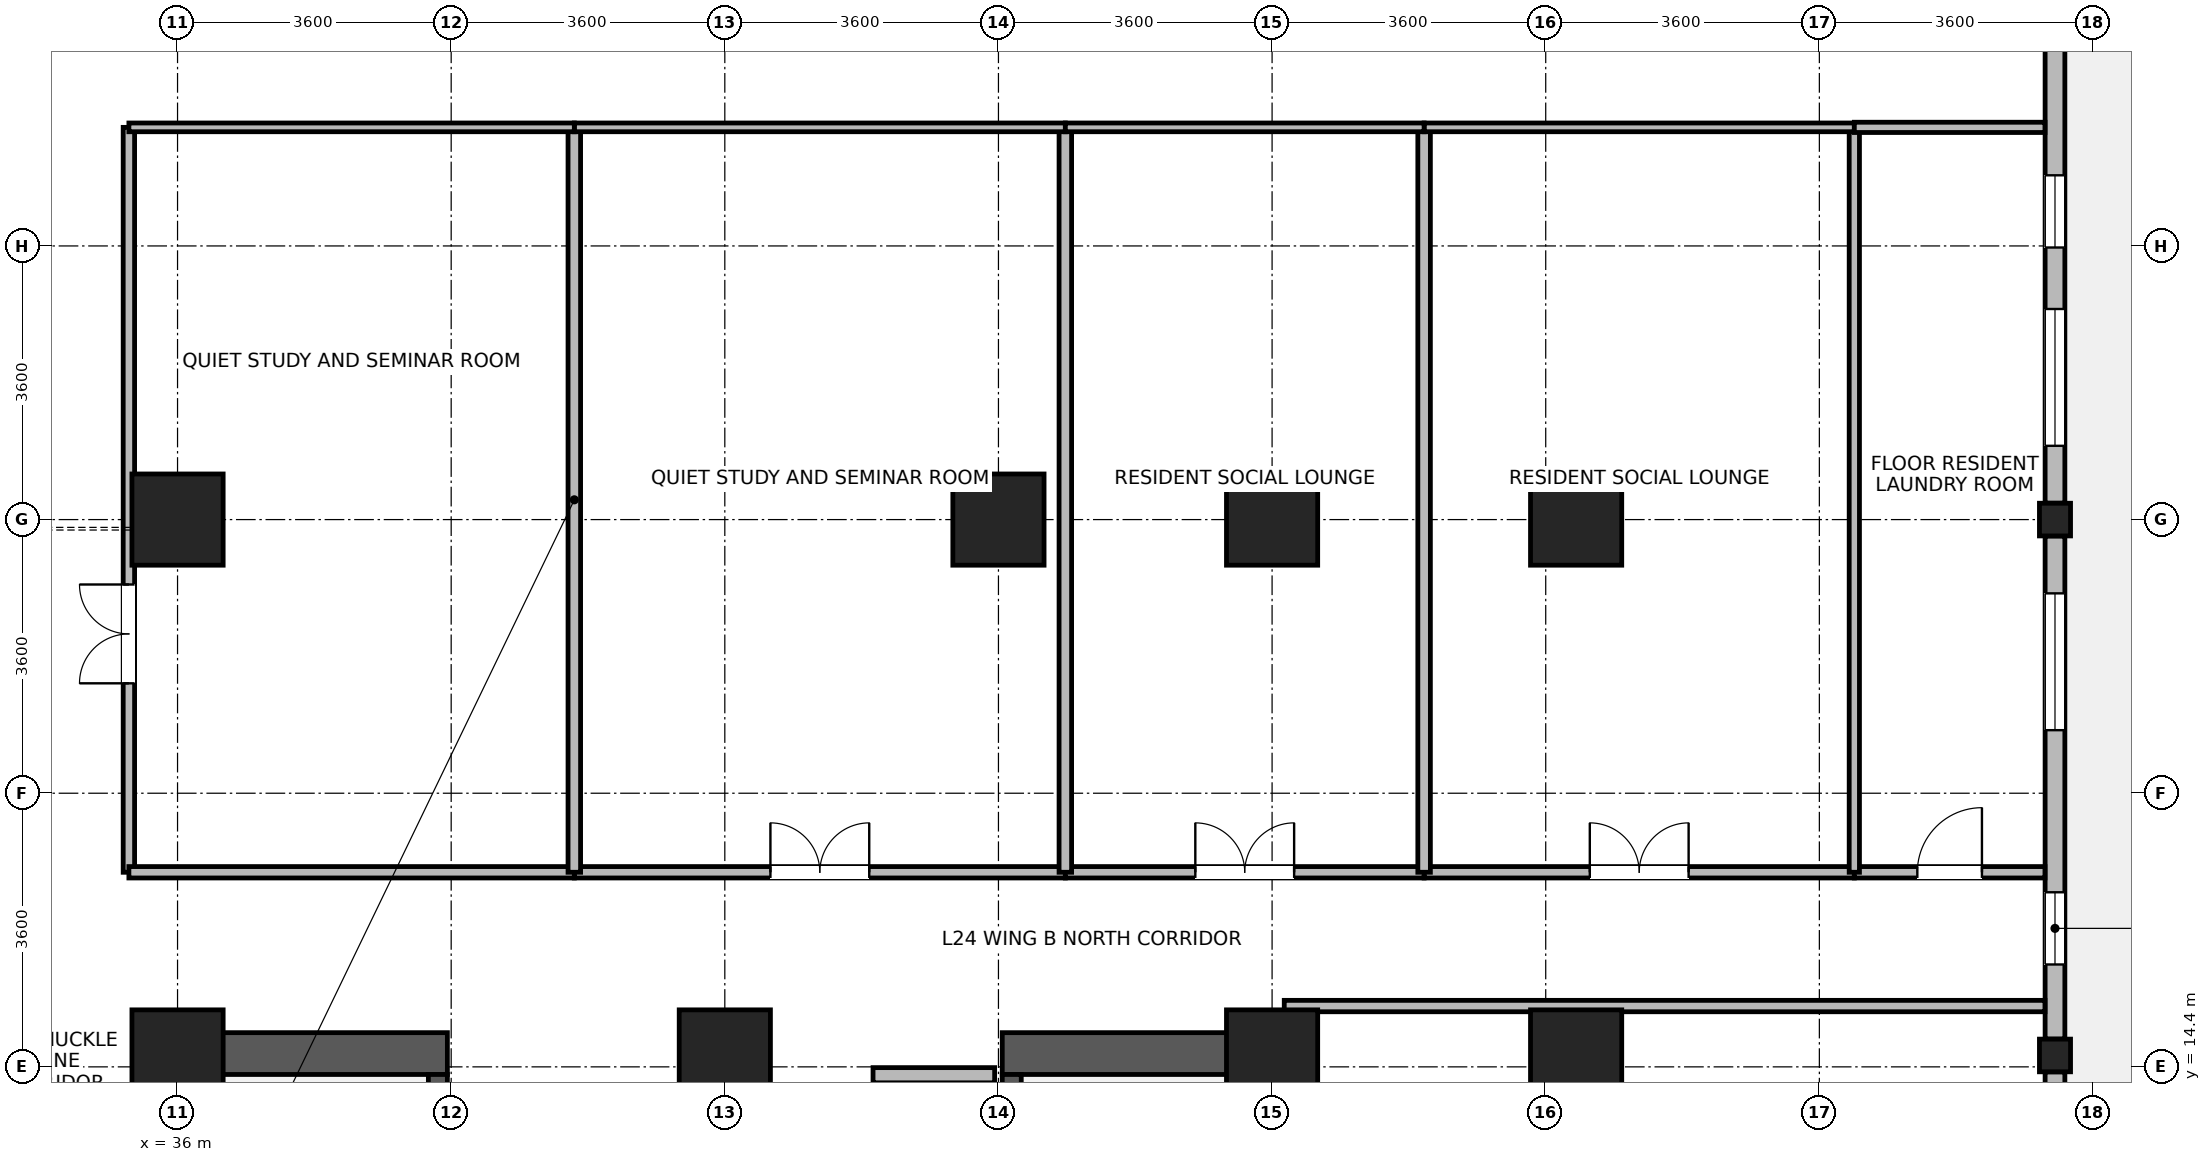
"""IFC4 building model, lengths in metres.
Left out: names, types, materials, properties, quantities, classifications, styles, units other than length and angle.
Written with IfcOpenShell. Run it as: python <this file> out.ifc"""

import sys

from ifc_helpers import new_model, si_unit, direction, frame, frame_2d, origin, origin_2d, place, context, subcontext, project, spatial, rectangle, i_section, extrude, source, transform, mapped, element, fill, save


model = new_model("IFC4")
c1 = context("Model", 3, precision=1e-05, world=origin(), true_north=direction((0.0, 1.0)))
c2 = subcontext(c1, "Body", "Model", "MODEL_VIEW")
j1 = project(units=[si_unit("LENGTHUNIT", "METRE"), si_unit("PLANEANGLEUNIT", "RADIAN")], contexts=[c1])
p1 = place(None, origin())
s1 = spatial("IfcSite", under=j1, at=p1, CompositionType="ELEMENT")
p2 = place(p1, origin())
s2 = spatial("IfcBuilding", under=s1, at=p2, CompositionType="ELEMENT")
p3 = place(p2, frame((0.0, 0.0, 97.1)))
s3 = spatial("IfcBuildingStorey", under=s2, at=p3, CompositionType="ELEMENT", Elevation=97.1)
for number, where, z_axis, x_axis in (
    (1, (36.075, 6.75, 0.0), (0.0, 0.0, 1.0), (0.0, 1.0, 0.0)),
    (2, (50.325, 6.75, 0.0), (0.0, 0.0, 1.0), (0.0, 1.0, 0.0)),
):
    element("IfcWall", number, at=place(p3, frame(where, z_axis=z_axis, x_axis=x_axis)), inside=s3, PredefinedType="SHEAR", context=c2, shape_type="SweptSolid", body=[
        extrude(rectangle(XDim=8.1, YDim=0.55, at=frame_2d((4.05, 0.0))), origin(), (0.0, 0.0, 1.0), 3.45),
    ])
for number, where, z_axis, x_axis in (
    (3, (36.35, 14.575, 0.0), (0.0, 0.0, 1.0), (1.0, 0.0, 0.0)),
    (4, (46.85, 14.575, 0.0), (0.0, 0.0, 1.0), (1.0, 0.0, 0.0)),
):
    element("IfcWall", number, at=place(p3, frame(where, z_axis=z_axis, x_axis=x_axis)), inside=s3, PredefinedType="SHEAR", context=c2, shape_type="SweptSolid", body=[
        extrude(rectangle(XDim=3.2, YDim=0.55, at=frame_2d((1.6, 0.0))), origin(), (0.0, 0.0, 1.0), 3.45),
    ])
p4 = place(p3, frame((39.425, 7.3, 0.0), z_axis=(0.0, 0.0, 1.0), x_axis=(0.0, 1.0, 0.0)))
e5 = element("IfcWall", 5, at=p4, inside=s3, PredefinedType="SHEAR", context=c2, shape_type="SweptSolid", body=[
    extrude(rectangle(XDim=7.0, YDim=0.25, at=frame_2d((3.5, 0.0))), origin(), (0.0, 0.0, 1.0), 3.45),
])
p5 = place(p4, frame((0.15, 0.0, 0.0)))
e6 = element("IfcOpeningElement", 6, at=p5, cuts=e5, PredefinedType="OPENING", context=c2, shape_type="SweptSolid", body=[
    extrude(rectangle(XDim=1.1, YDim=2.08, at=frame_2d((0.55, 1.04))), frame((0.0, 0.135, 0.0), z_axis=(0.0, -1.0, 0.0), x_axis=(1.0, 0.0, 0.0)), (0.0, 0.0, 1.0), 0.27),
])
p6 = place(p3, frame((46.975, 7.3, 0.0), z_axis=(0.0, 0.0, 1.0), x_axis=(0.0, 1.0, 0.0)))
e7 = element("IfcWall", 7, at=p6, inside=s3, PredefinedType="SHEAR", context=c2, shape_type="SweptSolid", body=[
    extrude(rectangle(XDim=7.0, YDim=0.25, at=frame_2d((3.5, 0.0))), origin(), (0.0, 0.0, 1.0), 3.45),
])
p7 = place(p6, frame((0.15, 0.0, 0.0)))
e8 = element("IfcOpeningElement", 8, at=p7, cuts=e7, PredefinedType="OPENING", context=c2, shape_type="SweptSolid", body=[
    extrude(rectangle(XDim=1.1, YDim=2.08, at=frame_2d((0.55, 1.04))), frame((0.0, 0.135, 0.0), z_axis=(0.0, -1.0, 0.0), x_axis=(1.0, 0.0, 0.0)), (0.0, 0.0, 1.0), 0.27),
])
m1 = source(origin(), c2, "Body", "SweptSolid", [
    extrude(rectangle(XDim=1.2, YDim=1.2, at=origin_2d()), origin(), (0.0, 0.0, 1.0), 3.7),
])
for number, where, z_axis, x_axis in (
    (9, (36.0, 21.6, 0.0), (0.0, 0.0, 1.0), (1.0, 0.0, 0.0)),
    (10, (46.8, 21.6, 0.0), (0.0, 0.0, 1.0), (1.0, 0.0, 0.0)),
    (11, (36.0, 14.55, 0.0), (0.0, 0.0, 1.0), (1.0, 0.0, 0.0)),
    (12, (43.2, 14.55, 0.0), (0.0, 0.0, 1.0), (1.0, 0.0, 0.0)),
    (13, (50.4, 14.55, 0.0), (0.0, 0.0, 1.0), (1.0, 0.0, 0.0)),
    (14, (50.4, 21.6, 0.0), (0.0, 0.0, 1.0), (1.0, 0.0, 0.0)),
    (15, (54.4, 14.55, 0.0), (0.0, 0.0, 1.0), (1.0, 0.0, 0.0)),
    (16, (54.4, 21.6, 0.0), (0.0, 0.0, 1.0), (1.0, 0.0, 0.0)),
):
    element("IfcColumn", number, at=place(p3, frame(where, z_axis=z_axis, x_axis=x_axis)), inside=s3, PredefinedType="COLUMN", context=c2, shape_type="MappedRepresentation", body=[
        mapped(m1, transform((0.0, 0.0, 0.0), x_axis=(1.0, 0.0, 0.0), y_axis=(0.0, 1.0, 0.0), z_axis=(0.0, 0.0, 1.0), scale=1.0)),
    ])
m2 = source(origin(), c2, "Body", "SweptSolid", [
    extrude(i_section(OverallWidth=0.409, OverallDepth=0.43, WebThickness=0.024, FlangeThickness=0.033, FilletRadius=0.015, at=origin_2d()), origin(), (0.0, 0.0, 1.0), 3.7),
])
for number, where, z_axis, x_axis in (
    (17, (60.7, 14.55, 0.0), (0.0, 0.0, 1.0), (1.0, 0.0, 0.0)),
    (18, (60.7, 21.6, 0.0), (0.0, 0.0, 1.0), (1.0, 0.0, 0.0)),
):
    element("IfcColumn", number, at=place(p3, frame(where, z_axis=z_axis, x_axis=x_axis)), inside=s3, PredefinedType="COLUMN", context=c2, shape_type="MappedRepresentation", body=[
        mapped(m2, transform((0.0, 0.0, 0.0), x_axis=(1.0, 0.0, 0.0), y_axis=(0.0, 1.0, 0.0), z_axis=(0.0, 0.0, 1.0), scale=1.0)),
    ])
p8 = place(p3, frame((60.7, 14.334, 0.0), z_axis=(0.0, 0.0, 1.0), x_axis=(0.0, -1.0, 0.0)))
e19 = element("IfcWall", 19, at=p8, inside=s3, PredefinedType="STANDARD", context=c2, shape_type="SweptSolid", body=[
    extrude(rectangle(XDim=7.068, YDim=0.26, at=frame_2d((3.534, 0.0))), origin(), (0.0, 0.0, 1.0), 2.98),
])
p9 = place(p8, frame((0.867, 0.0, 0.85)))
e20 = element("IfcOpeningElement", 20, at=p9, cuts=e19, PredefinedType="OPENING", context=c2, shape_type="SweptSolid", body=[
    extrude(rectangle(XDim=1.8, YDim=1.85, at=frame_2d((0.9, 0.925))), frame((0.0, 0.14, 0.0), z_axis=(0.0, -1.0, 0.0), x_axis=(1.0, 0.0, 0.0)), (0.0, 0.0, 1.0), 0.28),
])
p10 = place(p8, frame((4.401, 0.0, 0.85)))
e21 = element("IfcOpeningElement", 21, at=p10, cuts=e19, PredefinedType="OPENING", context=c2, shape_type="SweptSolid", body=[
    extrude(rectangle(XDim=1.8, YDim=1.85, at=frame_2d((0.9, 0.925))), frame((0.0, 0.14, 0.0), z_axis=(0.0, -1.0, 0.0), x_axis=(1.0, 0.0, 0.0)), (0.0, 0.0, 1.0), 0.28),
])
p11 = place(p3, frame((60.7, 21.384, 0.0), z_axis=(0.0, 0.0, 1.0), x_axis=(0.0, -1.0, 0.0)))
e22 = element("IfcWall", 22, at=p11, inside=s3, PredefinedType="STANDARD", context=c2, shape_type="SweptSolid", body=[
    extrude(rectangle(XDim=6.618, YDim=0.26, at=frame_2d((3.309, 0.0))), origin(), (0.0, 0.0, 1.0), 2.98),
])
p12 = place(p11, frame((0.754, 0.0, 0.85)))
e23 = element("IfcOpeningElement", 23, at=p12, cuts=e22, PredefinedType="OPENING", context=c2, shape_type="SweptSolid", body=[
    extrude(rectangle(XDim=1.8, YDim=1.85, at=frame_2d((0.9, 0.925))), frame((0.0, 0.14, 0.0), z_axis=(0.0, -1.0, 0.0), x_axis=(1.0, 0.0, 0.0)), (0.0, 0.0, 1.0), 0.28),
])
p13 = place(p11, frame((4.687, 0.0, 0.85)))
e24 = element("IfcOpeningElement", 24, at=p13, cuts=e22, PredefinedType="OPENING", context=c2, shape_type="SweptSolid", body=[
    extrude(rectangle(XDim=0.95, YDim=1.75, at=frame_2d((0.475, 0.875))), frame((0.0, 0.14, 0.0), z_axis=(0.0, -1.0, 0.0), x_axis=(1.0, 0.0, 0.0)), (0.0, 0.0, 1.0), 0.28),
])
p14 = place(p3, frame((60.7, 28.434, 0.0), z_axis=(0.0, 0.0, 1.0), x_axis=(0.0, -1.0, 0.0)))
e25 = element("IfcWall", 25, at=p14, inside=s3, PredefinedType="STANDARD", context=c2, shape_type="SweptSolid", body=[
    extrude(rectangle(XDim=6.618, YDim=0.26, at=frame_2d((3.309, 0.0))), origin(), (0.0, 0.0, 1.0), 2.98),
])
p15 = place(p14, frame((4.063, 0.0, 0.85)))
e26 = element("IfcOpeningElement", 26, at=p15, cuts=e25, PredefinedType="OPENING", context=c2, shape_type="SweptSolid", body=[
    extrude(rectangle(XDim=1.8, YDim=1.85, at=frame_2d((0.9, 0.925))), frame((0.0, 0.14, 0.0), z_axis=(0.0, -1.0, 0.0), x_axis=(1.0, 0.0, 0.0)), (0.0, 0.0, 1.0), 0.28),
])
p16 = place(p14, frame((2.305, 0.0, 0.85)))
e27 = element("IfcOpeningElement", 27, at=p16, cuts=e25, PredefinedType="OPENING", context=c2, shape_type="SweptSolid", body=[
    extrude(rectangle(XDim=0.95, YDim=1.75, at=frame_2d((0.475, 0.875))), frame((0.0, 0.14, 0.0), z_axis=(0.0, -1.0, 0.0), x_axis=(1.0, 0.0, 0.0)), (0.0, 0.0, 1.0), 0.28),
])
p17 = place(p3, frame((45.15, 14.29, 0.0), z_axis=(0.0, 0.0, 1.0), x_axis=(1.0, 0.0, 0.0)))
e28 = element("IfcWall", 28, at=p17, inside=s3, PredefinedType="PARTITIONING", context=c2, shape_type="SweptSolid", body=[
    extrude(rectangle(XDim=1.6, YDim=0.2, at=frame_2d((0.8, 0.0))), origin(), (0.0, 0.0, 1.0), 2.43),
])
p18 = place(p3, frame((50.56, 15.2, 0.0), z_axis=(0.0, 0.0, 1.0), x_axis=(1.0, 0.0, 0.0)))
e29 = element("IfcWall", 29, at=p18, inside=s3, PredefinedType="PARTITIONING", context=c2, shape_type="SweptSolid", body=[
    extrude(rectangle(XDim=10.008, YDim=0.15, at=frame_2d((5.004, 0.0))), origin(), (0.0, 0.0, 1.0), 3.43),
])
p19 = place(p3, frame((35.36, 16.96, 0.0), z_axis=(0.0, 0.0, 1.0), x_axis=(0.0, 1.0, 0.0)))
e30 = element("IfcWall", 30, at=p19, inside=s3, PredefinedType="PARTITIONING", context=c2, shape_type="SweptSolid", body=[
    extrude(rectangle(XDim=9.8, YDim=0.15, at=frame_2d((4.9, 0.0))), origin(), (0.0, 0.0, 1.0), 3.43),
])
p20 = place(p19, frame((2.486, 0.0, 0.0)))
e31 = element("IfcOpeningElement", 31, at=p20, cuts=e30, PredefinedType="OPENING", context=c2, shape_type="SweptSolid", body=[
    extrude(rectangle(XDim=1.3, YDim=2.12, at=frame_2d((0.65, 1.06))), frame((0.0, 0.085, 0.0), z_axis=(0.0, -1.0, 0.0), x_axis=(1.0, 0.0, 0.0)), (0.0, 0.0, 1.0), 0.17),
])
p21 = place(p3, frame((41.22, 16.96, 0.0), z_axis=(0.0, 0.0, 1.0), x_axis=(1.0, 0.0, 0.0)))
e32 = element("IfcWall", 32, at=p21, inside=s3, PredefinedType="PARTITIONING", context=c2, shape_type="SweptSolid", body=[
    extrude(rectangle(XDim=6.46, YDim=0.15, at=frame_2d((3.23, 0.0))), origin(), (0.0, 0.0, 1.0), 3.43),
])
p22 = place(p21, frame((2.58, 0.0, 0.0)))
e33 = element("IfcOpeningElement", 33, at=p22, cuts=e32, PredefinedType="OPENING", context=c2, shape_type="SweptSolid", body=[
    extrude(rectangle(XDim=1.3, YDim=2.12, at=frame_2d((0.65, 1.06))), frame((0.0, 0.085, 0.0), z_axis=(0.0, -1.0, 0.0), x_axis=(1.0, 0.0, 0.0)), (0.0, 0.0, 1.0), 0.17),
])
p23 = place(p3, frame((35.36, 16.96, 0.0), z_axis=(0.0, 0.0, 1.0), x_axis=(1.0, 0.0, 0.0)))
e34 = element("IfcWall", 34, at=p23, inside=s3, PredefinedType="PARTITIONING", context=c2, shape_type="SweptSolid", body=[
    extrude(rectangle(XDim=5.86, YDim=0.15, at=frame_2d((2.93, 0.0))), origin(), (0.0, 0.0, 1.0), 3.43),
])
p24 = place(p3, frame((52.4, 16.96, 0.0), z_axis=(0.0, 0.0, 1.0), x_axis=(1.0, 0.0, 0.0)))
e35 = element("IfcWall", 35, at=p24, inside=s3, PredefinedType="PARTITIONING", context=c2, shape_type="SweptSolid", body=[
    extrude(rectangle(XDim=5.66, YDim=0.15, at=frame_2d((2.83, 0.0))), origin(), (0.0, 0.0, 1.0), 3.43),
])
p25 = place(p24, frame((2.18, 0.0, 0.0)))
e36 = element("IfcOpeningElement", 36, at=p25, cuts=e35, PredefinedType="OPENING", context=c2, shape_type="SweptSolid", body=[
    extrude(rectangle(XDim=1.3, YDim=2.12, at=frame_2d((0.65, 1.06))), frame((0.0, 0.085, 0.0), z_axis=(0.0, -1.0, 0.0), x_axis=(1.0, 0.0, 0.0)), (0.0, 0.0, 1.0), 0.17),
])
p26 = place(p3, frame((47.68, 16.96, 0.0), z_axis=(0.0, 0.0, 1.0), x_axis=(1.0, 0.0, 0.0)))
e37 = element("IfcWall", 37, at=p26, inside=s3, PredefinedType="PARTITIONING", context=c2, shape_type="SweptSolid", body=[
    extrude(rectangle(XDim=4.72, YDim=0.15, at=frame_2d((2.36, 0.0))), origin(), (0.0, 0.0, 1.0), 3.43),
])
p27 = place(p26, frame((1.71, 0.0, 0.0)))
e38 = element("IfcOpeningElement", 38, at=p27, cuts=e37, PredefinedType="OPENING", context=c2, shape_type="SweptSolid", body=[
    extrude(rectangle(XDim=1.3, YDim=2.12, at=frame_2d((0.65, 1.06))), frame((0.0, 0.085, 0.0), z_axis=(0.0, -1.0, 0.0), x_axis=(1.0, 0.0, 0.0)), (0.0, 0.0, 1.0), 0.17),
])
p28 = place(p3, frame((58.06, 16.96, 0.0), z_axis=(0.0, 0.0, 1.0), x_axis=(1.0, 0.0, 0.0)))
e39 = element("IfcWall", 39, at=p28, inside=s3, PredefinedType="PARTITIONING", context=c2, shape_type="SweptSolid", body=[
    extrude(rectangle(XDim=2.508, YDim=0.15, at=frame_2d((1.254, 0.0))), origin(), (0.0, 0.0, 1.0), 3.43),
])
p29 = place(p28, frame((0.829, 0.0, 0.0)))
e40 = element("IfcOpeningElement", 40, at=p29, cuts=e39, PredefinedType="OPENING", context=c2, shape_type="SweptSolid", body=[
    extrude(rectangle(XDim=0.85, YDim=2.04, at=frame_2d((0.425, 1.02))), frame((0.0, 0.085, 0.0), z_axis=(0.0, -1.0, 0.0), x_axis=(1.0, 0.0, 0.0)), (0.0, 0.0, 1.0), 0.17),
])
for number, where, z_axis, x_axis in (
    (41, (41.22, 16.96, 0.0), (0.0, 0.0, 1.0), (0.0, 1.0, 0.0)),
    (42, (47.68, 16.96, 0.0), (0.0, 0.0, 1.0), (0.0, 1.0, 0.0)),
    (43, (52.4, 16.96, 0.0), (0.0, 0.0, 1.0), (0.0, 1.0, 0.0)),
):
    element("IfcWall", number, at=place(p3, frame(where, z_axis=z_axis, x_axis=x_axis)), inside=s3, PredefinedType="PARTITIONING", context=c2, shape_type="SweptSolid", body=[
        extrude(rectangle(XDim=9.8, YDim=0.165, at=frame_2d((4.9, 0.0))), origin(), (0.0, 0.0, 1.0), 3.43),
    ])
p30 = place(p3, frame((58.06, 16.96, 0.0), z_axis=(0.0, 0.0, 1.0), x_axis=(0.0, 1.0, 0.0)))
e44 = element("IfcWall", 44, at=p30, inside=s3, PredefinedType="PARTITIONING", context=c2, shape_type="SweptSolid", body=[
    extrude(rectangle(XDim=9.8, YDim=0.135, at=frame_2d((4.9, 0.0))), origin(), (0.0, 0.0, 1.0), 3.43),
])
p31 = place(p3, frame((41.22, 26.76, 0.0), z_axis=(0.0, 0.0, 1.0), x_axis=(1.0, 0.0, 0.0)))
e45 = element("IfcWall", 45, at=p31, inside=s3, PredefinedType="PARTITIONING", context=c2, shape_type="SweptSolid", body=[
    extrude(rectangle(XDim=6.46, YDim=0.115, at=frame_2d((3.23, 0.0))), origin(), (0.0, 0.0, 1.0), 3.43),
])
p32 = place(p3, frame((35.36, 26.76, 0.0), z_axis=(0.0, 0.0, 1.0), x_axis=(1.0, 0.0, 0.0)))
e46 = element("IfcWall", 46, at=p32, inside=s3, PredefinedType="PARTITIONING", context=c2, shape_type="SweptSolid", body=[
    extrude(rectangle(XDim=5.86, YDim=0.115, at=frame_2d((2.93, 0.0))), origin(), (0.0, 0.0, 1.0), 3.43),
])
p33 = place(p3, frame((52.4, 26.76, 0.0), z_axis=(0.0, 0.0, 1.0), x_axis=(1.0, 0.0, 0.0)))
e47 = element("IfcWall", 47, at=p33, inside=s3, PredefinedType="PARTITIONING", context=c2, shape_type="SweptSolid", body=[
    extrude(rectangle(XDim=5.66, YDim=0.115, at=frame_2d((2.83, 0.0))), origin(), (0.0, 0.0, 1.0), 3.43),
])
p34 = place(p3, frame((47.68, 26.76, 0.0), z_axis=(0.0, 0.0, 1.0), x_axis=(1.0, 0.0, 0.0)))
e48 = element("IfcWall", 48, at=p34, inside=s3, PredefinedType="PARTITIONING", context=c2, shape_type="SweptSolid", body=[
    extrude(rectangle(XDim=4.72, YDim=0.115, at=frame_2d((2.36, 0.0))), origin(), (0.0, 0.0, 1.0), 3.43),
])
p35 = place(p3, frame((58.06, 26.76, 0.0), z_axis=(0.0, 0.0, 1.0), x_axis=(1.0, 0.0, 0.0)))
e49 = element("IfcWall", 49, at=p35, inside=s3, PredefinedType="PARTITIONING", context=c2, shape_type="SweptSolid", body=[
    extrude(rectangle(XDim=2.508, YDim=0.135, at=frame_2d((1.254, 0.0))), origin(), (0.0, 0.0, 1.0), 3.43),
])
p36 = place(p12, origin())
e50 = element("IfcWindow", 50, at=p36, inside=s3, PartitioningType="SINGLE_PANEL", PredefinedType="WINDOW", context=c2, shape_type="SweptSolid", body=[
    extrude(rectangle(XDim=1.8, YDim=1.85, at=frame_2d((0.9, 0.925))), frame((0.0, 0.03, 0.0), z_axis=(0.0, -1.0, 0.0), x_axis=(1.0, 0.0, 0.0)), (0.0, 0.0, 1.0), 0.06),
])
fill(e23, e50)
p37 = place(p13, origin())
e51 = element("IfcWindow", 51, at=p37, inside=s3, PartitioningType="SINGLE_PANEL", PredefinedType="WINDOW", context=c2, shape_type="SweptSolid", body=[
    extrude(rectangle(XDim=0.95, YDim=1.75, at=frame_2d((0.475, 0.875))), frame((0.0, 0.03, 0.0), z_axis=(0.0, -1.0, 0.0), x_axis=(1.0, 0.0, 0.0)), (0.0, 0.0, 1.0), 0.06),
])
fill(e24, e51)
p38 = place(p15, origin())
e52 = element("IfcWindow", 52, at=p38, inside=s3, PartitioningType="SINGLE_PANEL", PredefinedType="WINDOW", context=c2, shape_type="SweptSolid", body=[
    extrude(rectangle(XDim=1.8, YDim=1.85, at=frame_2d((0.9, 0.925))), frame((0.0, 0.03, 0.0), z_axis=(0.0, -1.0, 0.0), x_axis=(1.0, 0.0, 0.0)), (0.0, 0.0, 1.0), 0.06),
])
fill(e26, e52)
p39 = place(p16, origin())
e53 = element("IfcWindow", 53, at=p39, inside=s3, PartitioningType="SINGLE_PANEL", PredefinedType="WINDOW", context=c2, shape_type="SweptSolid", body=[
    extrude(rectangle(XDim=0.95, YDim=1.75, at=frame_2d((0.475, 0.875))), frame((0.0, 0.03, 0.0), z_axis=(0.0, -1.0, 0.0), x_axis=(1.0, 0.0, 0.0)), (0.0, 0.0, 1.0), 0.06),
])
fill(e27, e53)
p40 = place(p20, origin())
e54 = element("IfcDoor", 54, at=p40, inside=s3, OperationType="DOUBLE_DOOR_SINGLE_SWING", PredefinedType="DOOR", context=c2, shape_type="SweptSolid", body=[
    extrude(rectangle(XDim=1.3, YDim=2.12, at=frame_2d((0.65, 1.06))), frame((0.0, 0.025, 0.0), z_axis=(0.0, -1.0, 0.0), x_axis=(1.0, 0.0, 0.0)), (0.0, 0.0, 1.0), 0.05),
])
fill(e31, e54)
p41 = place(p22, origin())
e55 = element("IfcDoor", 55, at=p41, inside=s3, OperationType="DOUBLE_DOOR_SINGLE_SWING", PredefinedType="DOOR", context=c2, shape_type="SweptSolid", body=[
    extrude(rectangle(XDim=1.3, YDim=2.12, at=frame_2d((0.65, 1.06))), frame((0.0, 0.025, 0.0), z_axis=(0.0, -1.0, 0.0), x_axis=(1.0, 0.0, 0.0)), (0.0, 0.0, 1.0), 0.05),
])
fill(e33, e55)
p42 = place(p25, origin())
e56 = element("IfcDoor", 56, at=p42, inside=s3, OperationType="DOUBLE_DOOR_SINGLE_SWING", PredefinedType="DOOR", context=c2, shape_type="SweptSolid", body=[
    extrude(rectangle(XDim=1.3, YDim=2.12, at=frame_2d((0.65, 1.06))), frame((0.0, 0.025, 0.0), z_axis=(0.0, -1.0, 0.0), x_axis=(1.0, 0.0, 0.0)), (0.0, 0.0, 1.0), 0.05),
])
fill(e36, e56)
p43 = place(p27, origin())
e57 = element("IfcDoor", 57, at=p43, inside=s3, OperationType="DOUBLE_DOOR_SINGLE_SWING", PredefinedType="DOOR", context=c2, shape_type="SweptSolid", body=[
    extrude(rectangle(XDim=1.3, YDim=2.12, at=frame_2d((0.65, 1.06))), frame((0.0, 0.025, 0.0), z_axis=(0.0, -1.0, 0.0), x_axis=(1.0, 0.0, 0.0)), (0.0, 0.0, 1.0), 0.05),
])
fill(e38, e57)
p44 = place(p29, origin())
e58 = element("IfcDoor", 58, at=p44, inside=s3, OperationType="SINGLE_SWING_RIGHT", PredefinedType="DOOR", context=c2, shape_type="SweptSolid", body=[
    extrude(rectangle(XDim=0.85, YDim=2.04, at=frame_2d((0.425, 1.02))), frame((0.0, 0.025, 0.0), z_axis=(0.0, -1.0, 0.0), x_axis=(1.0, 0.0, 0.0)), (0.0, 0.0, 1.0), 0.05),
])
fill(e40, e58)
save(model, sys.argv[1])
